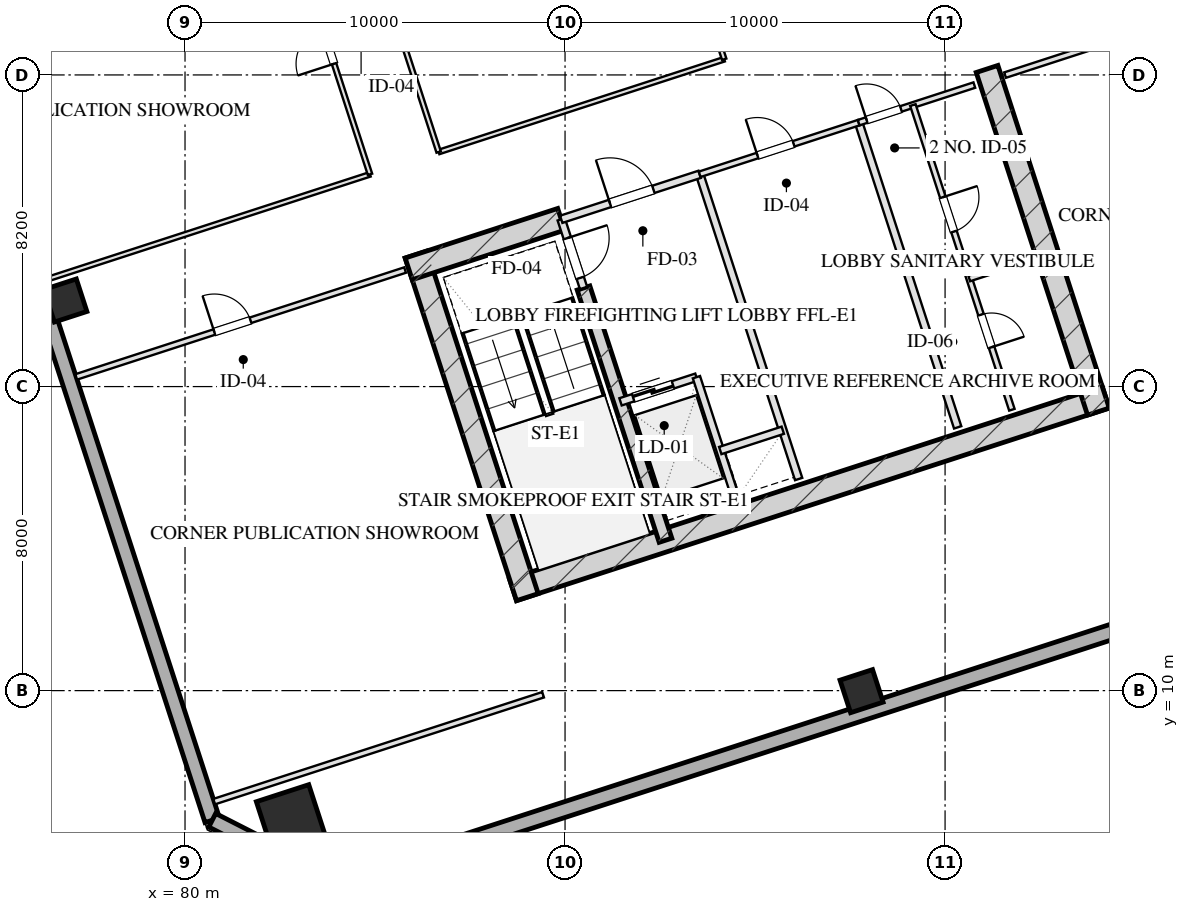
"""IFC4 building model, lengths in metres.
Left out: names, types, materials, properties, quantities, classifications, styles, units other than length and angle.
Written with IfcOpenShell. Run it as: python <this file> out.ifc"""

import sys

from ifc_helpers import new_model, si_unit, direction, frame, frame_2d, origin, origin_2d, place, context, subcontext, project, spatial, rectangle, hollow_rectangle, extrude, element, fill, save


model = new_model("IFC4")
c1 = context("Model", 3, precision=1e-05, world=origin(), true_north=direction((0.0, 1.0)))
c2 = subcontext(c1, "Body", "Model", "MODEL_VIEW")
j1 = project(units=[si_unit("LENGTHUNIT", "METRE"), si_unit("PLANEANGLEUNIT", "RADIAN")], contexts=[c1])
p1 = place(None, origin())
s1 = spatial("IfcSite", under=j1, at=p1, CompositionType="ELEMENT")
p2 = place(p1, origin())
s2 = spatial("IfcBuilding", under=s1, at=p2, CompositionType="ELEMENT")
p3 = place(p2, frame((0.0, 0.0, 117.3)))
s3 = spatial("IfcBuildingStorey", under=s2, at=p3, CompositionType="ELEMENT", Elevation=117.3)
p4 = place(p3, frame((88.63, 12.652, 0.0), z_axis=(0.0, 0.0, 1.0), x_axis=(0.95105714907, 0.309015046886, 0.0)))
e1 = element("IfcWall", 1, at=p4, inside=s3, PredefinedType="SHEAR", context=c2, shape_type="SweptSolid", body=[
    extrude(rectangle(XDim=16.4, YDim=0.6, at=frame_2d((8.2, 0.0))), origin(), (0.0, 0.0, 1.0), 3.45),
])
p5 = place(p3, frame((86.078, 21.475, 0.0), z_axis=(0.0, 0.0, 1.0), x_axis=(0.309017938678, -0.951056209472, 0.0)))
e2 = element("IfcWall", 2, at=p5, inside=s3, PredefinedType="SHEAR", context=c2, shape_type="SweptSolid", body=[
    extrude(rectangle(XDim=9.48, YDim=0.6, at=frame_2d((4.74, 0.0))), origin(), (0.0, 0.0, 1.0), 3.45),
])
p6 = place(p3, frame((101.105, 26.358, 0.0), z_axis=(0.0, 0.0, 1.0), x_axis=(0.309010370028, -0.95105866865, 0.0)))
e3 = element("IfcWall", 3, at=p6, inside=s3, PredefinedType="SHEAR", context=c2, shape_type="SweptSolid", body=[
    extrude(rectangle(XDim=9.48, YDim=0.6, at=frame_2d((4.74, 0.0))), origin(), (0.0, 0.0, 1.0), 3.45),
])
p7 = place(p3, frame((90.486, 20.594, 0.0), z_axis=(0.0, 0.0, 1.0), x_axis=(0.309020428229, -0.951055400562, 0.0)))
e4 = element("IfcWall", 4, at=p7, inside=s3, PredefinedType="SHEAR", context=c2, shape_type="SweptSolid", body=[
    extrude(rectangle(XDim=6.98, YDim=0.35, at=frame_2d((3.49, 0.0))), origin(), (0.0, 0.0, 1.0), 3.45),
])
p8 = place(p3, frame((85.886, 21.097, 0.0), z_axis=(0.0, 0.0, 1.0), x_axis=(0.951068073652, 0.308981422225, 0.0)))
e5 = element("IfcWall", 5, at=p8, inside=s3, PredefinedType="SHEAR", context=c2, shape_type="SweptSolid", body=[
    extrude(rectangle(XDim=4.22, YDim=0.6, at=frame_2d((2.11, 0.0))), origin(), (0.0, 0.0, 1.0), 3.45),
])
p9 = place(p3, frame((82.791, 6.612, 0.0), z_axis=(0.0, 0.0, 1.0), x_axis=(0.951056516295, 0.309016994375, 0.0)))
e6 = element("IfcColumn", 6, at=p9, inside=s3, PredefinedType="COLUMN", context=c2, shape_type="SweptSolid", body=[
    extrude(hollow_rectangle(XDim=1.45, YDim=1.45, WallThickness=0.05, at=origin_2d()), origin(), (0.0, 0.0, 1.0), 3.451),
])
for number, where, z_axis, x_axis in (
    (7, (76.851, 20.264, 0.0), (0.0, 0.0, 1.0), (0.951, 0.309, 0.0)),
    (8, (97.803, 9.986, 0.0), (0.0, 0.0, 1.0), (0.951, 0.309, 0.0)),
):
    element("IfcColumn", number, at=place(p3, frame(where, z_axis=z_axis, x_axis=x_axis)), inside=s3, PredefinedType="COLUMN", context=c2, shape_type="SweptSolid", body=[
        extrude(hollow_rectangle(XDim=0.9, YDim=0.9, WallThickness=0.032, at=origin_2d()), origin(), (0.0, 0.0, 1.0), 3.451),
    ])
p10 = place(p3, frame((80.716, 6.59, 0.0), z_axis=(0.0, 0.0, 1.0), x_axis=(-0.309017542002, 0.95105633836, 0.0)))
e9 = element("IfcWall", 9, at=p10, inside=s3, PredefinedType="SOLIDWALL", context=c2, shape_type="SweptSolid", body=[
    extrude(rectangle(XDim=46.4, YDim=0.4, at=frame_2d((23.2, 0.0))), origin(), (0.0, 0.0, 1.0), 2.61),
])
p11 = place(p10, frame((15.6, 0.0, 0.75)))
e10 = element("IfcOpeningElement", 10, at=p11, cuts=e9, PredefinedType="OPENING", context=c2, shape_type="SweptSolid", body=[
    extrude(rectangle(XDim=2.4, YDim=1.46, at=frame_2d((1.2, 0.73))), frame((0.0, 0.21, 0.0), z_axis=(0.0, -1.0, 0.0), x_axis=(1.0, 0.0, 0.0)), (0.0, 0.0, 1.0), 0.42),
])
p12 = place(p10, frame((28.4, 0.0, 0.75)))
e11 = element("IfcOpeningElement", 11, at=p12, cuts=e9, PredefinedType="OPENING", context=c2, shape_type="SweptSolid", body=[
    extrude(rectangle(XDim=2.4, YDim=1.46, at=frame_2d((1.2, 0.73))), frame((0.0, 0.21, 0.0), z_axis=(0.0, -1.0, 0.0), x_axis=(1.0, 0.0, 0.0)), (0.0, 0.0, 1.0), 0.42),
])
p13 = place(p3, frame((99.284, 61.41, 0.0), z_axis=(0.0, 0.0, 1.0), x_axis=(0.309017542002, -0.95105633836, 0.0)))
e12 = element("IfcWall", 12, at=p13, inside=s3, PredefinedType="SOLIDWALL", context=c2, shape_type="SweptSolid", body=[
    extrude(rectangle(XDim=46.4, YDim=0.4, at=frame_2d((23.2, 0.0))), origin(), (0.0, 0.0, 1.0), 2.61),
])
p14 = place(p3, frame((111.953, 14.005, 0.0), z_axis=(0.0, 0.0, 1.0), x_axis=(-0.95105505922, -0.309021478754, 0.0)))
e13 = element("IfcWall", 13, at=p14, inside=s3, PredefinedType="SOLIDWALL", context=c2, shape_type="SweptSolid", body=[
    extrude(rectangle(XDim=29.4, YDim=0.4, at=frame_2d((14.7, 0.0))), origin(), (0.0, 0.0, 1.0), 2.61),
])
p15 = place(p3, frame((83.992, 4.92, 0.0), z_axis=(0.0, 0.0, 1.0), x_axis=(-0.891001999643, 0.45399937955, 0.0)))
e14 = element("IfcWall", 14, at=p15, inside=s3, PredefinedType="SOLIDWALL", context=c2, shape_type="SweptSolid", body=[
    extrude(rectangle(XDim=3.677, YDim=0.4, at=frame_2d((1.839, 0.0))), origin(), (0.0, 0.0, 1.0), 2.61),
])
p16 = place(p3, frame((89.899, 22.401, 0.0), z_axis=(0.0, 0.0, 1.0), x_axis=(0.308932062672, -0.951084108086, 0.0)))
e15 = element("IfcWall", 15, at=p16, inside=s3, PredefinedType="PARTITIONING", context=c2, shape_type="SweptSolid", body=[
    extrude(rectangle(XDim=1.9, YDim=0.2, at=frame_2d((0.95, 0.0))), origin(), (0.0, 0.0, 1.0), 3.175),
])
p17 = place(p16, frame((0.52, 0.0, 0.0)))
e16 = element("IfcOpeningElement", 16, at=p17, cuts=e15, PredefinedType="OPENING", context=c2, shape_type="SweptSolid", body=[
    extrude(rectangle(XDim=1.1, YDim=2.05, at=frame_2d((0.55, 1.025))), frame((0.0, 0.11, 0.0), z_axis=(0.0, -1.0, 0.0), x_axis=(1.0, 0.0, 0.0)), (0.0, 0.0, 1.0), 0.22),
])
p18 = place(p3, frame((93.542, 23.585, 0.0), z_axis=(0.0, 0.0, 1.0), x_axis=(0.309042196757, -0.951048327176, 0.0)))
e17 = element("IfcWall", 17, at=p18, inside=s3, PredefinedType="PARTITIONING", context=c2, shape_type="SweptSolid", body=[
    extrude(rectangle(XDim=8.43, YDim=0.2, at=frame_2d((4.215, 0.0))), origin(), (0.0, 0.0, 1.0), 3.175),
])
p19 = place(p3, frame((89.899, 22.401, 0.0), z_axis=(0.0, 0.0, 1.0), x_axis=(0.951046716504, 0.309047153403, 0.0)))
e18 = element("IfcWall", 18, at=p19, inside=s3, PredefinedType="PARTITIONING", context=c2, shape_type="SweptSolid", body=[
    extrude(rectangle(XDim=3.83, YDim=0.2, at=frame_2d((1.915, 0.0))), origin(), (0.0, 0.0, 1.0), 3.175),
])
p20 = place(p19, frame((1.35, 0.0, 0.0)))
e19 = element("IfcOpeningElement", 19, at=p20, cuts=e18, PredefinedType="OPENING", context=c2, shape_type="SweptSolid", body=[
    extrude(rectangle(XDim=1.2, YDim=2.05, at=frame_2d((0.6, 1.025))), frame((0.0, 0.11, 0.0), z_axis=(0.0, -1.0, 0.0), x_axis=(1.0, 0.0, 0.0)), (0.0, 0.0, 1.0), 0.22),
])
p21 = place(p3, frame((91.46, 17.598, 0.0), z_axis=(0.0, 0.0, 1.0), x_axis=(0.951062257173, 0.308999325213, 0.0)))
e20 = element("IfcWall", 20, at=p21, inside=s3, PredefinedType="PARTITIONING", context=c2, shape_type="SweptSolid", body=[
    extrude(rectangle(XDim=2.1, YDim=0.2, at=frame_2d((1.05, 0.0))), origin(), (0.0, 0.0, 1.0), 3.175),
])
p22 = place(p21, frame((0.35, 0.0, 0.0)))
e21 = element("IfcOpeningElement", 21, at=p22, cuts=e20, PredefinedType="OPENING", context=c2, shape_type="SweptSolid", body=[
    extrude(rectangle(XDim=1.1, YDim=2.05, at=frame_2d((0.55, 1.025))), frame((0.0, 0.11, 0.0), z_axis=(0.0, -1.0, 0.0), x_axis=(1.0, 0.0, 0.0)), (0.0, 0.0, 1.0), 0.22),
])
p23 = place(p3, frame((93.457, 18.247, 0.0), z_axis=(0.0, 0.0, 1.0), x_axis=(0.3089935693, -0.951064127245, 0.0)))
e22 = element("IfcWall", 22, at=p23, inside=s3, PredefinedType="PARTITIONING", context=c2, shape_type="SweptSolid", body=[
    extrude(rectangle(XDim=3.7, YDim=0.2, at=frame_2d((1.85, 0.0))), origin(), (0.0, 0.0, 1.0), 3.175),
])
p24 = place(p3, frame((94.084, 16.317, 0.0), z_axis=(0.0, 0.0, 1.0), x_axis=(0.951041328149, 0.309063734775, 0.0)))
e23 = element("IfcWall", 23, at=p24, inside=s3, PredefinedType="PARTITIONING", context=c2, shape_type="SweptSolid", body=[
    extrude(rectangle(XDim=1.73, YDim=0.2, at=frame_2d((0.865, 0.0))), origin(), (0.0, 0.0, 1.0), 3.175),
])
p25 = place(p3, frame((97.727, 24.944, 0.0), z_axis=(0.0, 0.0, 1.0), x_axis=(0.309016001439, -0.951056838919, 0.0)))
e24 = element("IfcWall", 24, at=p25, inside=s3, PredefinedType="PARTITIONING", context=c2, shape_type="SweptSolid", body=[
    extrude(rectangle(XDim=8.43, YDim=0.2, at=frame_2d((4.215, 0.0))), origin(), (0.0, 0.0, 1.0), 3.175),
])
p26 = place(p3, frame((93.542, 23.585, 0.0), z_axis=(0.0, 0.0, 1.0), x_axis=(0.951063829732, 0.308994485023, 0.0)))
e25 = element("IfcWall", 25, at=p26, inside=s3, PredefinedType="PARTITIONING", context=c2, shape_type="SweptSolid", body=[
    extrude(rectangle(XDim=4.4, YDim=0.15, at=frame_2d((2.2, 0.0))), origin(), (0.0, 0.0, 1.0), 3.175),
])
p27 = place(p26, frame((1.6, 0.0, 0.0)))
e26 = element("IfcOpeningElement", 26, at=p27, cuts=e25, PredefinedType="OPENING", context=c2, shape_type="SweptSolid", body=[
    extrude(rectangle(XDim=1.0, YDim=2.05, at=frame_2d((0.5, 1.025))), frame((0.0, 0.085, 0.0), z_axis=(0.0, -1.0, 0.0), x_axis=(1.0, 0.0, 0.0)), (0.0, 0.0, 1.0), 0.17),
])
p28 = place(p3, frame((97.727, 24.944, 0.0), z_axis=(0.0, 0.0, 1.0), x_axis=(0.951036872128, 0.309077446369, 0.0)))
e27 = element("IfcWall", 27, at=p28, inside=s3, PredefinedType="PARTITIONING", context=c2, shape_type="SweptSolid", body=[
    extrude(rectangle(XDim=3.2, YDim=0.15, at=frame_2d((1.6, 0.0))), origin(), (0.0, 0.0, 1.0), 3.175),
])
p29 = place(p28, frame((0.22, 0.0, 0.0)))
e28 = element("IfcOpeningElement", 28, at=p29, cuts=e27, PredefinedType="OPENING", context=c2, shape_type="SweptSolid", body=[
    extrude(rectangle(XDim=0.95, YDim=2.05, at=frame_2d((0.475, 1.025))), frame((0.0, 0.085, 0.0), z_axis=(0.0, -1.0, 0.0), x_axis=(1.0, 0.0, 0.0)), (0.0, 0.0, 1.0), 0.17),
])
p30 = place(p3, frame((99.153, 25.408, 0.0), z_axis=(0.0, 0.0, 1.0), x_axis=(0.309016001439, -0.951056838919, 0.0)))
e29 = element("IfcWall", 29, at=p30, inside=s3, PredefinedType="PARTITIONING", context=c2, shape_type="SweptSolid", body=[
    extrude(rectangle(XDim=8.43, YDim=0.15, at=frame_2d((4.215, 0.0))), origin(), (0.0, 0.0, 1.0), 3.175),
])
p31 = place(p30, frame((2.55, 0.0, 0.0)))
e30 = element("IfcOpeningElement", 30, at=p31, cuts=e29, PredefinedType="OPENING", context=c2, shape_type="SweptSolid", body=[
    extrude(rectangle(XDim=0.95, YDim=2.05, at=frame_2d((0.475, 1.025))), frame((0.0, 0.085, 0.0), z_axis=(0.0, -1.0, 0.0), x_axis=(1.0, 0.0, 0.0)), (0.0, 0.0, 1.0), 0.17),
])
p32 = place(p30, frame((5.8, 0.0, 0.0)))
e31 = element("IfcOpeningElement", 31, at=p32, cuts=e29, PredefinedType="OPENING", context=c2, shape_type="SweptSolid", body=[
    extrude(rectangle(XDim=0.9, YDim=2.05, at=frame_2d((0.45, 1.025))), frame((0.0, 0.085, 0.0), z_axis=(0.0, -1.0, 0.0), x_axis=(1.0, 0.0, 0.0)), (0.0, 0.0, 1.0), 0.17),
])
p33 = place(p3, frame((100.636, 20.843, 0.0), z_axis=(0.0, 0.0, 1.0), x_axis=(0.951040401051, 0.309066587596, 0.0)))
e32 = element("IfcWall", 32, at=p33, inside=s3, PredefinedType="PARTITIONING", context=c2, shape_type="SweptSolid", body=[
    extrude(rectangle(XDim=1.7, YDim=0.15, at=frame_2d((0.85, 0.0))), origin(), (0.0, 0.0, 1.0), 3.175),
])
p34 = place(p3, frame((80.767, 7.079, 0.0), z_axis=(0.0, 0.0, 1.0), x_axis=(0.951057133767, 0.309015093986, 0.0)))
e33 = element("IfcWall", 33, at=p34, inside=s3, PredefinedType="PARTITIONING", context=c2, shape_type="SweptSolid", body=[
    extrude(rectangle(XDim=9.1, YDim=0.15, at=frame_2d((4.55, 0.0))), origin(), (0.0, 0.0, 1.0), 3.175),
])
p35 = place(p3, frame((77.136, 18.254, 0.0), z_axis=(0.0, 0.0, 1.0), x_axis=(0.951057133767, 0.309015093986, 0.0)))
e34 = element("IfcWall", 34, at=p35, inside=s3, PredefinedType="PARTITIONING", context=c2, shape_type="SweptSolid", body=[
    extrude(rectangle(XDim=9.1, YDim=0.15, at=frame_2d((4.55, 0.0))), origin(), (0.0, 0.0, 1.0), 3.175),
])
p36 = place(p35, frame((3.822, 0.0, 0.0)))
e35 = element("IfcOpeningElement", 35, at=p36, cuts=e34, PredefinedType="OPENING", context=c2, shape_type="SweptSolid", body=[
    extrude(rectangle(XDim=1.0, YDim=2.05, at=frame_2d((0.5, 1.025))), frame((0.0, 0.085, 0.0), z_axis=(0.0, -1.0, 0.0), x_axis=(1.0, 0.0, 0.0)), (0.0, 0.0, 1.0), 0.17),
])
p37 = place(p3, frame((101.578, 26.196, 0.0), z_axis=(0.0, 0.0, 1.0), x_axis=(0.951062770994, 0.308997743729, 0.0)))
e36 = element("IfcWall", 36, at=p37, inside=s3, PredefinedType="PARTITIONING", context=c2, shape_type="SweptSolid", body=[
    extrude(rectangle(XDim=8.5, YDim=0.15, at=frame_2d((4.25, 0.0))), origin(), (0.0, 0.0, 1.0), 3.175),
])
p38 = place(p37, frame((3.57, 0.0, 0.0)))
e37 = element("IfcOpeningElement", 37, at=p38, cuts=e36, PredefinedType="OPENING", context=c2, shape_type="SweptSolid", body=[
    extrude(rectangle(XDim=1.0, YDim=2.05, at=frame_2d((0.5, 1.025))), frame((0.0, 0.085, 0.0), z_axis=(0.0, -1.0, 0.0), x_axis=(1.0, 0.0, 0.0)), (0.0, 0.0, 1.0), 0.17),
])
p39 = place(p3, frame((76.308, 20.803, 0.0), z_axis=(0.0, 0.0, 1.0), x_axis=(0.951054001411, 0.309024734286, 0.0)))
e38 = element("IfcWall", 38, at=p39, inside=s3, PredefinedType="PARTITIONING", context=c2, shape_type="SweptSolid", body=[
    extrude(rectangle(XDim=9.0, YDim=0.12, at=frame_2d((4.5, 0.0))), origin(), (0.0, 0.0, 1.0), 3.175),
])
p40 = place(p3, frame((86.675, 24.171, 0.0), z_axis=(0.0, 0.0, 1.0), x_axis=(0.951057231385, 0.309014793547, 0.0)))
e39 = element("IfcWall", 39, at=p40, inside=s3, PredefinedType="PARTITIONING", context=c2, shape_type="SweptSolid", body=[
    extrude(rectangle(XDim=7.9, YDim=0.12, at=frame_2d((3.95, 0.0))), origin(), (0.0, 0.0, 1.0), 3.175),
])
p41 = place(p3, frame((84.867, 23.584, 0.0), z_axis=(0.0, 0.0, 1.0), x_axis=(-0.309022042254, 0.951054876125, 0.0)))
e40 = element("IfcWall", 40, at=p41, inside=s3, PredefinedType="PARTITIONING", context=c2, shape_type="SweptSolid", body=[
    extrude(rectangle(XDim=16.64, YDim=0.12, at=frame_2d((8.32, 0.0))), origin(), (0.0, 0.0, 1.0), 3.175),
])
p42 = place(p41, frame((3.06, 0.0, 0.0)))
e41 = element("IfcOpeningElement", 41, at=p42, cuts=e40, PredefinedType="OPENING", context=c2, shape_type="SweptSolid", body=[
    extrude(rectangle(XDim=1.0, YDim=2.05, at=frame_2d((0.5, 1.025))), frame((0.0, 0.07, 0.0), z_axis=(0.0, -1.0, 0.0), x_axis=(1.0, 0.0, 0.0)), (0.0, 0.0, 1.0), 0.14),
])
p43 = place(p41, frame((9.22, 0.0, 0.0)))
e42 = element("IfcOpeningElement", 42, at=p43, cuts=e40, PredefinedType="OPENING", context=c2, shape_type="SweptSolid", body=[
    extrude(rectangle(XDim=1.0, YDim=2.05, at=frame_2d((0.5, 1.025))), frame((0.0, 0.07, 0.0), z_axis=(0.0, -1.0, 0.0), x_axis=(1.0, 0.0, 0.0)), (0.0, 0.0, 1.0), 0.14),
])
p44 = place(p41, frame((13.98, 0.0, 0.0)))
e43 = element("IfcOpeningElement", 43, at=p44, cuts=e40, PredefinedType="OPENING", context=c2, shape_type="SweptSolid", body=[
    extrude(rectangle(XDim=0.85, YDim=2.05, at=frame_2d((0.425, 1.025))), frame((0.0, 0.07, 0.0), z_axis=(0.0, -1.0, 0.0), x_axis=(1.0, 0.0, 0.0)), (0.0, 0.0, 1.0), 0.14),
])
p45 = place(p3, frame((86.675, 24.171, 0.0), z_axis=(0.0, 0.0, 1.0), x_axis=(-0.309022042254, 0.951054876125, 0.0)))
e44 = element("IfcWall", 44, at=p45, inside=s3, PredefinedType="PARTITIONING", context=c2, shape_type="SweptSolid", body=[
    extrude(rectangle(XDim=16.64, YDim=0.12, at=frame_2d((8.32, 0.0))), origin(), (0.0, 0.0, 1.0), 3.175),
])
p46 = place(p45, frame((3.204, 0.0, 0.0)))
e45 = element("IfcOpeningElement", 45, at=p46, cuts=e44, PredefinedType="OPENING", context=c2, shape_type="SweptSolid", body=[
    extrude(rectangle(XDim=1.1, YDim=2.05, at=frame_2d((0.55, 1.025))), frame((0.0, 0.07, 0.0), z_axis=(0.0, -1.0, 0.0), x_axis=(1.0, 0.0, 0.0)), (0.0, 0.0, 1.0), 0.14),
])
p47 = place(p45, frame((14.264, 0.0, 0.0)))
e46 = element("IfcOpeningElement", 46, at=p47, cuts=e44, PredefinedType="OPENING", context=c2, shape_type="SweptSolid", body=[
    extrude(rectangle(XDim=1.1, YDim=2.05, at=frame_2d((0.55, 1.025))), frame((0.0, 0.07, 0.0), z_axis=(0.0, -1.0, 0.0), x_axis=(1.0, 0.0, 0.0)), (0.0, 0.0, 1.0), 0.14),
])
p48 = place(p3, frame((94.188, 26.613, 0.0), z_axis=(0.0, 0.0, 1.0), x_axis=(-0.30901773025, 0.951056277195, 0.0)))
e47 = element("IfcWall", 47, at=p48, inside=s3, PredefinedType="PARTITIONING", context=c2, shape_type="SweptSolid", body=[
    extrude(rectangle(XDim=16.64, YDim=0.12, at=frame_2d((8.32, 0.0))), origin(), (0.0, 0.0, 1.0), 3.175),
])
p49 = place(p48, frame((9.304, 0.0, 0.0)))
e48 = element("IfcOpeningElement", 48, at=p49, cuts=e47, PredefinedType="OPENING", context=c2, shape_type="SweptSolid", body=[
    extrude(rectangle(XDim=1.1, YDim=2.05, at=frame_2d((0.55, 1.025))), frame((0.0, 0.07, 0.0), z_axis=(0.0, -1.0, 0.0), x_axis=(1.0, 0.0, 0.0)), (0.0, 0.0, 1.0), 0.14),
])
p50 = place(p17, origin())
e49 = element("IfcDoor", 49, at=p50, inside=s3, OperationType="SINGLE_SWING_LEFT", PredefinedType="DOOR", context=c2, shape_type="SweptSolid", body=[
    extrude(rectangle(XDim=1.1, YDim=2.05, at=frame_2d((0.55, 1.025))), frame((0.0, 0.025, 0.0), z_axis=(0.0, -1.0, 0.0), x_axis=(1.0, 0.0, 0.0)), (0.0, 0.0, 1.0), 0.05),
])
fill(e16, e49)
p51 = place(p20, origin())
e50 = element("IfcDoor", 50, at=p51, inside=s3, OperationType="SINGLE_SWING_LEFT", PredefinedType="DOOR", context=c2, shape_type="SweptSolid", body=[
    extrude(rectangle(XDim=1.2, YDim=2.05, at=frame_2d((0.6, 1.025))), frame((0.0, 0.025, 0.0), z_axis=(0.0, -1.0, 0.0), x_axis=(1.0, 0.0, 0.0)), (0.0, 0.0, 1.0), 0.05),
])
fill(e19, e50)
p52 = place(p22, origin())
e51 = element("IfcDoor", 51, at=p52, inside=s3, OperationType="DOUBLE_DOOR_SLIDING", PredefinedType="DOOR", context=c2, shape_type="SweptSolid", body=[
    extrude(rectangle(XDim=1.1, YDim=2.05, at=frame_2d((0.55, 1.025))), frame((0.0, 0.025, 0.0), z_axis=(0.0, -1.0, 0.0), x_axis=(1.0, 0.0, 0.0)), (0.0, 0.0, 1.0), 0.05),
])
fill(e21, e51)
p53 = place(p27, origin())
e52 = element("IfcDoor", 52, at=p53, inside=s3, OperationType="SINGLE_SWING_LEFT", PredefinedType="DOOR", context=c2, shape_type="SweptSolid", body=[
    extrude(rectangle(XDim=1.0, YDim=2.05, at=frame_2d((0.5, 1.025))), frame((0.0, 0.025, 0.0), z_axis=(0.0, -1.0, 0.0), x_axis=(1.0, 0.0, 0.0)), (0.0, 0.0, 1.0), 0.05),
])
fill(e26, e52)
p54 = place(p29, origin())
e53 = element("IfcDoor", 53, at=p54, inside=s3, OperationType="SINGLE_SWING_LEFT", PredefinedType="DOOR", context=c2, shape_type="SweptSolid", body=[
    extrude(rectangle(XDim=0.95, YDim=2.05, at=frame_2d((0.475, 1.025))), frame((0.0, 0.025, 0.0), z_axis=(0.0, -1.0, 0.0), x_axis=(1.0, 0.0, 0.0)), (0.0, 0.0, 1.0), 0.05),
])
fill(e28, e53)
p55 = place(p31, origin())
e54 = element("IfcDoor", 54, at=p55, inside=s3, OperationType="SINGLE_SWING_LEFT", PredefinedType="DOOR", context=c2, shape_type="SweptSolid", body=[
    extrude(rectangle(XDim=0.95, YDim=2.05, at=frame_2d((0.475, 1.025))), frame((0.0, 0.025, 0.0), z_axis=(0.0, -1.0, 0.0), x_axis=(1.0, 0.0, 0.0)), (0.0, 0.0, 1.0), 0.05),
])
fill(e30, e54)
p56 = place(p32, origin())
e55 = element("IfcDoor", 55, at=p56, inside=s3, OperationType="SINGLE_SWING_RIGHT", PredefinedType="DOOR", context=c2, shape_type="SweptSolid", body=[
    extrude(rectangle(XDim=0.9, YDim=2.05, at=frame_2d((0.45, 1.025))), frame((0.0, 0.025, 0.0), z_axis=(0.0, -1.0, 0.0), x_axis=(1.0, 0.0, 0.0)), (0.0, 0.0, 1.0), 0.05),
])
fill(e31, e55)
p57 = place(p36, origin())
e56 = element("IfcDoor", 56, at=p57, inside=s3, OperationType="SINGLE_SWING_LEFT", PredefinedType="DOOR", context=c2, shape_type="SweptSolid", body=[
    extrude(rectangle(XDim=1.0, YDim=2.05, at=frame_2d((0.5, 1.025))), frame((0.0, 0.025, 0.0), z_axis=(0.0, -1.0, 0.0), x_axis=(1.0, 0.0, 0.0)), (0.0, 0.0, 1.0), 0.05),
])
fill(e35, e56)
p58 = place(p42, origin())
e57 = element("IfcDoor", 57, at=p58, inside=s3, OperationType="SINGLE_SWING_LEFT", PredefinedType="DOOR", context=c2, shape_type="SweptSolid", body=[
    extrude(rectangle(XDim=1.0, YDim=2.05, at=frame_2d((0.5, 1.025))), frame((0.0, 0.025, 0.0), z_axis=(0.0, -1.0, 0.0), x_axis=(1.0, 0.0, 0.0)), (0.0, 0.0, 1.0), 0.05),
])
fill(e41, e57)
save(model, sys.argv[1])
